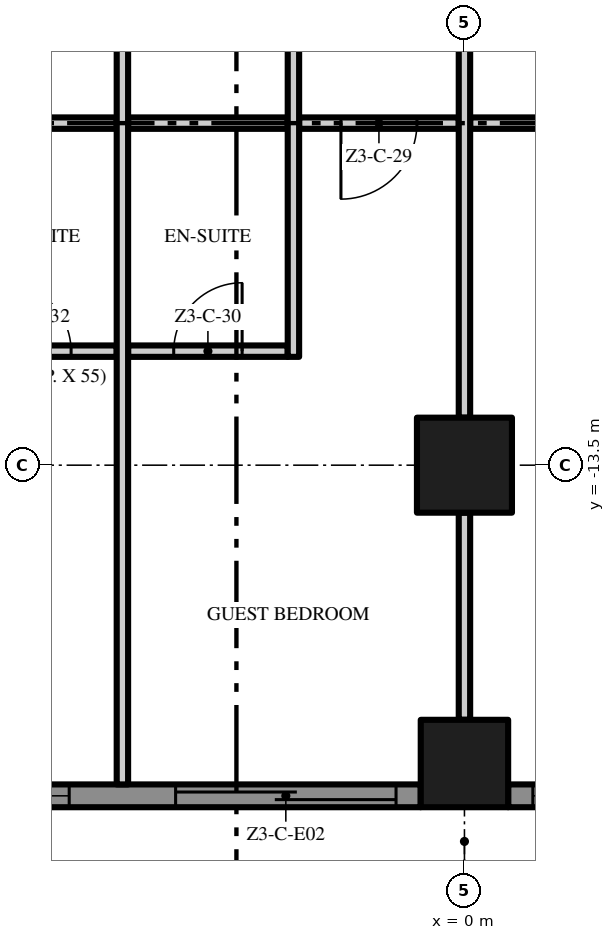
"""IFC4 building model, lengths in metres.
Left out: names, types, materials, properties, quantities, classifications, styles, units other than length and angle.
Written with IfcOpenShell. Run it as: python <this file> out.ifc"""

import sys

from ifc_helpers import new_model, si_unit, direction, frame, frame_2d, origin, origin_2d, place, context, subcontext, project, spatial, polyline, rectangle, outline, extrude, element, fill, save


model = new_model("IFC4")
c1 = context("Model", 3, precision=1e-05, world=origin(), true_north=direction((0.0, 1.0)))
c2 = subcontext(c1, "Body", "Model", "MODEL_VIEW")
j1 = project(units=[si_unit("LENGTHUNIT", "METRE"), si_unit("PLANEANGLEUNIT", "RADIAN")], contexts=[c1])
p1 = place(None, origin())
s1 = spatial("IfcSite", under=j1, at=p1, CompositionType="ELEMENT")
p2 = place(p1, origin())
s2 = spatial("IfcBuilding", under=s1, at=p2, CompositionType="ELEMENT")
p3 = place(p2, frame((0.0, 0.0, 151.6)))
s3 = spatial("IfcBuildingStorey", under=s2, at=p3, CompositionType="ELEMENT", Elevation=151.6)
p4 = place(p3, frame((0.0, -13.5, 0.0), z_axis=(0.0, 0.0, 1.0), x_axis=(1.0, 0.0, 0.0)))
e1 = element("IfcColumn", 1, at=p4, inside=s3, PredefinedType="COLUMN", context=c2, shape_type="SweptSolid", body=[
    extrude(rectangle(XDim=1.25, YDim=1.25, at=origin_2d()), origin(), (0.0, 0.0, 1.0), 3.5),
])
p5 = place(p3, frame((0.0, -17.425, 0.0), z_axis=(0.0, 0.0, 1.0), x_axis=(1.0, 0.0, 0.0)))
e2 = element("IfcColumn", 2, at=p5, inside=s3, PredefinedType="COLUMN", context=c2, shape_type="SweptSolid", body=[
    extrude(rectangle(XDim=1.15, YDim=1.15, at=origin_2d()), origin(), (0.0, 0.0, 1.0), 3.5),
])
p6 = place(p3, frame((-0.575, -17.85, 0.0), z_axis=(0.0, 0.0, 1.0), x_axis=(-1.0, 0.0, 0.0)))
e3 = element("IfcWall", 3, at=p6, inside=s3, PredefinedType="SOLIDWALL", context=c2, shape_type="SweptSolid", body=[
    extrude(rectangle(XDim=7.85, YDim=0.3, at=frame_2d((3.925, 0.0))), origin(), (0.0, 0.0, 1.0), 3.5),
])
p7 = place(p6, frame((4.625, 0.0, 0.45)))
e4 = element("IfcOpeningElement", 4, at=p7, cuts=e3, PredefinedType="OPENING", context=c2, shape_type="SweptSolid", body=[
    extrude(rectangle(XDim=2.9, YDim=2.65, at=frame_2d((1.45, 1.325))), frame((0.0, 0.16, 0.0), z_axis=(0.0, -1.0, 0.0), x_axis=(1.0, 0.0, 0.0)), (0.0, 0.0, 1.0), 0.32),
])
p8 = place(p6, frame((0.325, 0.0, 0.0)))
e5 = element("IfcOpeningElement", 5, at=p8, cuts=e3, PredefinedType="OPENING", context=c2, shape_type="SweptSolid", body=[
    extrude(rectangle(XDim=2.9, YDim=2.4, at=frame_2d((1.45, 1.2))), frame((0.0, 0.16, 0.0), z_axis=(0.0, -1.0, 0.0), x_axis=(1.0, 0.0, 0.0)), (0.0, 0.0, 1.0), 0.32),
])
p9 = place(p3, frame((8.425, -17.85, 0.0), z_axis=(0.0, 0.0, 1.0), x_axis=(-1.0, 0.0, 0.0)))
e6 = element("IfcWall", 6, at=p9, inside=s3, PredefinedType="SOLIDWALL", context=c2, shape_type="SweptSolid", body=[
    extrude(rectangle(XDim=7.85, YDim=0.3, at=frame_2d((3.925, 0.0))), origin(), (0.0, 0.0, 1.0), 3.5),
])
p10 = place(p9, frame((4.625, 0.0, 0.45)))
e7 = element("IfcOpeningElement", 7, at=p10, cuts=e6, PredefinedType="OPENING", context=c2, shape_type="SweptSolid", body=[
    extrude(rectangle(XDim=2.9, YDim=2.65, at=frame_2d((1.45, 1.325))), frame((0.0, 0.16, 0.0), z_axis=(0.0, -1.0, 0.0), x_axis=(1.0, 0.0, 0.0)), (0.0, 0.0, 1.0), 0.32),
])
p11 = place(p9, frame((0.325, 0.0, 0.45)))
e8 = element("IfcOpeningElement", 8, at=p11, cuts=e6, PredefinedType="OPENING", context=c2, shape_type="SweptSolid", body=[
    extrude(rectangle(XDim=2.9, YDim=2.65, at=frame_2d((1.45, 1.325))), frame((0.0, 0.16, 0.0), z_axis=(0.0, -1.0, 0.0), x_axis=(1.0, 0.0, 0.0)), (0.0, 0.0, 1.0), 0.32),
])
p12 = place(p3, origin())
e9 = element("IfcWall", 9, at=p12, inside=s3, PredefinedType="USERDEFINED", context=c2, shape_type="SweptSolid", body=[
    extrude(outline(polyline([(-18.0, -21.0), (-16.5, -20.771), (-15.0, -20.171), (-13.5, -19.429), (-12.0, -18.829), (-10.5, -18.6), (-9.0, -18.829), (-7.5, -19.429), (-6.0, -20.171), (-4.5, -20.771), (-3.0, -21.0), (-1.5, -20.771), (0.0, -20.171), (1.5, -19.429), (3.0, -18.829), (4.5, -18.6), (6.0, -18.829), (7.5, -19.429), (9.0, -20.171), (10.5, -20.771), (12.0, -21.0), (13.5, -20.771), (15.0, -20.171), (16.5, -19.429), (18.0, -18.829), (17.907, -18.597), (16.398, -19.201), (14.898, -19.942), (13.434, -20.528), (12.0, -20.747), (10.566, -20.528), (9.102, -19.942), (7.602, -19.201), (6.066, -18.586), (4.5, -18.347), (2.934, -18.586), (1.398, -19.201), (-0.102, -19.942), (-1.566, -20.528), (-3.0, -20.747), (-4.434, -20.528), (-5.898, -19.942), (-7.398, -19.201), (-8.934, -18.586), (-10.5, -18.347), (-12.066, -18.586), (-13.602, -19.201), (-15.102, -19.942), (-16.566, -20.528), (-18.038, -20.753), (-18.0, -21.0)])), origin(), (0.0, 0.0, 1.0), 0.9),
])
p13 = place(p3, frame((-6.675, -12.0, 0.0), z_axis=(0.0, 0.0, 1.0), x_axis=(1.0, 0.0, 0.0)))
e10 = element("IfcWall", 10, at=p13, inside=s3, PredefinedType="PARTITIONING", context=c2, shape_type="SweptSolid", body=[
    extrude(rectangle(XDim=2.1, YDim=0.15, at=frame_2d((1.05, 0.0))), origin(), (0.0, 0.0, 1.0), 3.5),
])
p14 = place(p13, frame((0.6, 0.0, 0.0)))
e11 = element("IfcOpeningElement", 11, at=p14, cuts=e10, PredefinedType="OPENING", context=c2, shape_type="SweptSolid", body=[
    extrude(rectangle(XDim=0.9, YDim=2.1, at=frame_2d((0.45, 1.05))), frame((0.0, 0.085, 0.0), z_axis=(0.0, -1.0, 0.0), x_axis=(1.0, 0.0, 0.0)), (0.0, 0.0, 1.0), 0.17),
])
p15 = place(p3, frame((-4.425, -12.0, 0.0), z_axis=(0.0, 0.0, 1.0), x_axis=(1.0, 0.0, 0.0)))
e12 = element("IfcWall", 12, at=p15, inside=s3, PredefinedType="PARTITIONING", context=c2, shape_type="SweptSolid", body=[
    extrude(rectangle(XDim=2.1, YDim=0.15, at=frame_2d((1.05, 0.0))), origin(), (0.0, 0.0, 1.0), 3.5),
])
p16 = place(p15, frame((0.6, 0.0, 0.0)))
e13 = element("IfcOpeningElement", 13, at=p16, cuts=e12, PredefinedType="OPENING", context=c2, shape_type="SweptSolid", body=[
    extrude(rectangle(XDim=0.9, YDim=2.1, at=frame_2d((0.45, 1.05))), frame((0.0, 0.085, 0.0), z_axis=(0.0, -1.0, 0.0), x_axis=(1.0, 0.0, 0.0)), (0.0, 0.0, 1.0), 0.17),
])
for number, where, z_axis, x_axis in (
    (14, (-6.675, -9.0, 0.0), (0.0, 0.0, 1.0), (1.0, 0.0, 0.0)),
    (15, (-4.425, -9.0, 0.0), (0.0, 0.0, 1.0), (1.0, 0.0, 0.0)),
):
    element("IfcWall", number, at=place(p3, frame(where, z_axis=z_axis, x_axis=x_axis)), inside=s3, PredefinedType="PARTITIONING", context=c2, shape_type="SweptSolid", body=[
        extrude(rectangle(XDim=2.1, YDim=0.15, at=frame_2d((1.05, 0.0))), origin(), (0.0, 0.0, 1.0), 3.5),
    ])
p17 = place(p3, frame((-0.075, -9.0, 0.0), z_axis=(0.0, 0.0, 1.0), x_axis=(-1.0, 0.0, 0.0)))
e16 = element("IfcWall", 16, at=p17, inside=s3, PredefinedType="PARTITIONING", context=c2, shape_type="SweptSolid", body=[
    extrude(rectangle(XDim=2.1, YDim=0.15, at=frame_2d((1.05, 0.0))), origin(), (0.0, 0.0, 1.0), 3.5),
])
p18 = place(p17, frame((0.55, 0.0, 0.0)))
e17 = element("IfcOpeningElement", 17, at=p18, cuts=e16, PredefinedType="OPENING", context=c2, shape_type="SweptSolid", body=[
    extrude(rectangle(XDim=1.0, YDim=2.4, at=frame_2d((0.5, 1.2))), frame((0.0, 0.085, 0.0), z_axis=(0.0, -1.0, 0.0), x_axis=(1.0, 0.0, 0.0)), (0.0, 0.0, 1.0), 0.17),
])
p19 = place(p3, frame((4.425, -9.0, 0.0), z_axis=(0.0, 0.0, 1.0), x_axis=(-1.0, 0.0, 0.0)))
e18 = element("IfcWall", 18, at=p19, inside=s3, PredefinedType="PARTITIONING", context=c2, shape_type="SweptSolid", body=[
    extrude(rectangle(XDim=4.35, YDim=0.15, at=frame_2d((2.175, 0.0))), origin(), (0.0, 0.0, 1.0), 3.5),
])
p20 = place(p19, frame((0.575, 0.0, 0.0)))
e19 = element("IfcOpeningElement", 19, at=p20, cuts=e18, PredefinedType="OPENING", context=c2, shape_type="SweptSolid", body=[
    extrude(rectangle(XDim=1.0, YDim=2.4, at=frame_2d((0.5, 1.2))), frame((0.0, 0.085, 0.0), z_axis=(0.0, -1.0, 0.0), x_axis=(1.0, 0.0, 0.0)), (0.0, 0.0, 1.0), 0.17),
])
p21 = place(p3, frame((-4.5, -17.7, 0.0), z_axis=(0.0, 0.0, 1.0), x_axis=(0.0, 1.0, 0.0)))
e20 = element("IfcWall", 20, at=p21, inside=s3, PredefinedType="PARTITIONING", context=c2, shape_type="SweptSolid", body=[
    extrude(rectangle(XDim=13.125, YDim=0.15, at=frame_2d((6.562, 0.0))), origin(), (0.0, 0.0, 1.0), 3.5),
])
p22 = place(p3, frame((-2.25, -12.075, 0.0), z_axis=(0.0, 0.0, 1.0), x_axis=(0.0, 1.0, 0.0)))
e21 = element("IfcWall", 21, at=p22, inside=s3, PredefinedType="PARTITIONING", context=c2, shape_type="SweptSolid", body=[
    extrude(rectangle(XDim=7.65, YDim=0.15, at=frame_2d((3.825, 0.0))), origin(), (0.0, 0.0, 1.0), 3.5),
])
p23 = place(p3, frame((0.0, -16.85, 0.0), z_axis=(0.0, 0.0, 1.0), x_axis=(0.0, 1.0, 0.0)))
e22 = element("IfcWall", 22, at=p23, inside=s3, PredefinedType="PARTITIONING", context=c2, shape_type="SweptSolid", body=[
    extrude(rectangle(XDim=2.725, YDim=0.15, at=frame_2d((1.363, 0.0))), origin(), (0.0, 0.0, 1.0), 3.5),
])
p24 = place(p3, frame((0.0, -12.875, 0.0), z_axis=(0.0, 0.0, 1.0), x_axis=(0.0, 1.0, 0.0)))
e23 = element("IfcWall", 23, at=p24, inside=s3, PredefinedType="PARTITIONING", context=c2, shape_type="SweptSolid", body=[
    extrude(rectangle(XDim=7.75, YDim=0.15, at=frame_2d((3.875, 0.0))), origin(), (0.0, 0.0, 1.0), 3.5),
])
p25 = place(p7, origin())
e24 = element("IfcWindow", 24, at=p25, inside=s3, PartitioningType="SINGLE_PANEL", PredefinedType="WINDOW", context=c2, shape_type="SweptSolid", body=[
    extrude(rectangle(XDim=2.9, YDim=2.65, at=frame_2d((1.45, 1.325))), frame((0.0, 0.03, 0.0), z_axis=(0.0, -1.0, 0.0), x_axis=(1.0, 0.0, 0.0)), (0.0, 0.0, 1.0), 0.06),
])
fill(e4, e24)
p26 = place(p8, origin())
e25 = element("IfcDoor", 25, at=p26, inside=s3, OperationType="SINGLE_SWING_LEFT", PredefinedType="DOOR", context=c2, shape_type="SweptSolid", body=[
    extrude(rectangle(XDim=2.9, YDim=2.4, at=frame_2d((1.45, 1.2))), frame((0.0, 0.025, 0.0), z_axis=(0.0, -1.0, 0.0), x_axis=(1.0, 0.0, 0.0)), (0.0, 0.0, 1.0), 0.05),
])
fill(e5, e25)
p27 = place(p10, origin())
e26 = element("IfcWindow", 26, at=p27, inside=s3, PartitioningType="SINGLE_PANEL", PredefinedType="WINDOW", context=c2, shape_type="SweptSolid", body=[
    extrude(rectangle(XDim=2.9, YDim=2.65, at=frame_2d((1.45, 1.325))), frame((0.0, 0.03, 0.0), z_axis=(0.0, -1.0, 0.0), x_axis=(1.0, 0.0, 0.0)), (0.0, 0.0, 1.0), 0.06),
])
fill(e7, e26)
p28 = place(p18, origin())
e27 = element("IfcDoor", 27, at=p28, inside=s3, OperationType="SINGLE_SWING_RIGHT", PredefinedType="DOOR", context=c2, shape_type="SweptSolid", body=[
    extrude(rectangle(XDim=1.0, YDim=2.4, at=frame_2d((0.5, 1.2))), frame((0.0, 0.025, 0.0), z_axis=(0.0, -1.0, 0.0), x_axis=(1.0, 0.0, 0.0)), (0.0, 0.0, 1.0), 0.05),
])
fill(e17, e27)
p29 = place(p16, origin())
e28 = element("IfcDoor", 28, at=p29, inside=s3, OperationType="SINGLE_SWING_RIGHT", PredefinedType="DOOR", context=c2, shape_type="SweptSolid", body=[
    extrude(rectangle(XDim=0.9, YDim=2.1, at=frame_2d((0.45, 1.05))), frame((0.0, 0.025, 0.0), z_axis=(0.0, -1.0, 0.0), x_axis=(1.0, 0.0, 0.0)), (0.0, 0.0, 1.0), 0.05),
])
fill(e13, e28)
p30 = place(p14, origin())
e29 = element("IfcDoor", 29, at=p30, inside=s3, OperationType="SINGLE_SWING_LEFT", PredefinedType="DOOR", context=c2, shape_type="SweptSolid", body=[
    extrude(rectangle(XDim=0.9, YDim=2.1, at=frame_2d((0.45, 1.05))), frame((0.0, 0.025, 0.0), z_axis=(0.0, -1.0, 0.0), x_axis=(1.0, 0.0, 0.0)), (0.0, 0.0, 1.0), 0.05),
])
fill(e11, e29)
save(model, sys.argv[1])
